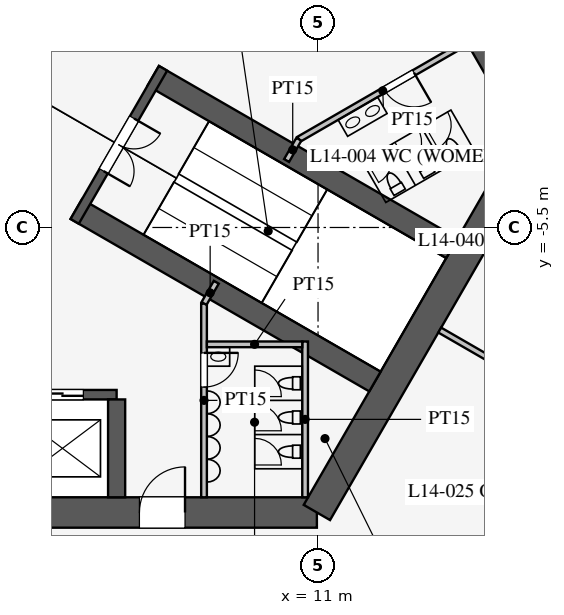
"""IFC4 building model, lengths in metres.
Left out: names, types, materials, properties, quantities, classifications, styles, units other than length and angle.
Written with IfcOpenShell. Run it as: python <this file> out.ifc"""

import sys

from ifc_helpers import new_model, si_unit, direction, frame, frame_2d, origin, place, context, subcontext, project, spatial, rectangle, extrude, element, fill, save


model = new_model("IFC4")
c1 = context("Model", 3, precision=1e-05, world=origin(), true_north=direction((0.0, 1.0)))
c2 = subcontext(c1, "Body", "Model", "MODEL_VIEW")
j1 = project(units=[si_unit("LENGTHUNIT", "METRE"), si_unit("PLANEANGLEUNIT", "RADIAN")], contexts=[c1])
p1 = place(None, origin())
s1 = spatial("IfcSite", under=j1, at=p1, CompositionType="ELEMENT")
p2 = place(p1, origin())
s2 = spatial("IfcBuilding", under=s1, at=p2, CompositionType="ELEMENT")
p3 = place(p2, frame((0.0, 0.0, 62.7)))
s3 = spatial("IfcBuildingStorey", under=s2, at=p3, CompositionType="ELEMENT", Elevation=62.7)
p4 = place(p3, frame((-10.97, -13.0, 0.0), z_axis=(0.0, 0.0, 1.0), x_axis=(1.0, 0.0, 0.0)))
e1 = element("IfcWall", 1, at=p4, inside=s3, PredefinedType="SHEAR", context=c2, shape_type="SweptSolid", body=[
    extrude(rectangle(XDim=21.939, YDim=0.8, at=frame_2d((10.97, 0.0))), origin(), (0.0, 0.0, 1.0), 4.2),
])
p5 = place(p4, frame((17.27, 0.0, 0.0)))
e2 = element("IfcOpeningElement", 2, at=p5, cuts=e1, PredefinedType="OPENING", context=c2, shape_type="SweptSolid", body=[
    extrude(rectangle(XDim=1.2, YDim=2.1, at=frame_2d((0.6, 1.05))), frame((0.0, 0.41, 0.0), z_axis=(0.0, -1.0, 0.0), x_axis=(1.0, 0.0, 0.0)), (0.0, 0.0, 1.0), 0.82),
])
p6 = place(p4, frame((3.47, 0.0, 0.0)))
e3 = element("IfcOpeningElement", 3, at=p6, cuts=e1, PredefinedType="OPENING", context=c2, shape_type="SweptSolid", body=[
    extrude(rectangle(XDim=1.2, YDim=2.1, at=frame_2d((0.6, 1.05))), frame((0.0, 0.41, 0.0), z_axis=(0.0, -1.0, 0.0), x_axis=(1.0, 0.0, 0.0)), (0.0, 0.0, 1.0), 0.82),
])
p7 = place(p3, frame((10.97, -13.0, 0.0), z_axis=(0.0, 0.0, 1.0), x_axis=(0.499995765644, 0.866027848477, 0.0)))
e4 = element("IfcWall", 4, at=p7, inside=s3, PredefinedType="SHEAR", context=c2, shape_type="SweptSolid", body=[
    extrude(rectangle(XDim=11.547, YDim=0.8, at=frame_2d((5.773, 0.0))), origin(), (0.0, 0.0, 1.0), 4.2),
])
p8 = place(p3, frame((16.743, -3.0, 0.0), z_axis=(0.0, 0.0, 1.0), x_axis=(-0.500002442456, 0.866023993627, 0.0)))
e5 = element("IfcWall", 5, at=p8, inside=s3, PredefinedType="SHEAR", context=c2, shape_type="SweptSolid", body=[
    extrude(rectangle(XDim=21.939, YDim=0.8, at=frame_2d((10.97, 0.0))), origin(), (0.0, 0.0, 1.0), 4.2),
])
p9 = place(p8, frame((17.27, 0.0, 0.0)))
e6 = element("IfcOpeningElement", 6, at=p9, cuts=e5, PredefinedType="OPENING", context=c2, shape_type="SweptSolid", body=[
    extrude(rectangle(XDim=1.2, YDim=2.1, at=frame_2d((0.6, 1.05))), frame((0.0, 0.41, 0.0), z_axis=(0.0, -1.0, 0.0), x_axis=(1.0, 0.0, 0.0)), (0.0, 0.0, 1.0), 0.82),
])
p10 = place(p8, frame((3.47, 0.0, 0.0)))
e7 = element("IfcOpeningElement", 7, at=p10, cuts=e5, PredefinedType="OPENING", context=c2, shape_type="SweptSolid", body=[
    extrude(rectangle(XDim=1.2, YDim=2.1, at=frame_2d((0.6, 1.05))), frame((0.0, 0.41, 0.0), z_axis=(0.0, -1.0, 0.0), x_axis=(1.0, 0.0, 0.0)), (0.0, 0.0, 1.0), 0.82),
])
p11 = place(p3, frame((-5.7, -9.9, 0.0), z_axis=(0.0, 0.0, 1.0), x_axis=(1.0, 0.0, 0.0)))
e8 = element("IfcWall", 8, at=p11, inside=s3, PredefinedType="SHEAR", context=c2, shape_type="SweptSolid", body=[
    extrude(rectangle(XDim=11.4, YDim=0.25, at=frame_2d((5.7, 0.0))), origin(), (0.0, 0.0, 1.0), 4.2),
])
p12 = place(p11, frame((0.875, 0.0, 0.0)))
e9 = element("IfcOpeningElement", 9, at=p12, cuts=e8, PredefinedType="OPENING", context=c2, shape_type="SweptSolid", body=[
    extrude(rectangle(XDim=1.1, YDim=2.2, at=frame_2d((0.55, 1.1))), frame((0.0, 0.135, 0.0), z_axis=(0.0, -1.0, 0.0), x_axis=(1.0, 0.0, 0.0)), (0.0, 0.0, 1.0), 0.27),
])
p13 = place(p11, frame((3.725, 0.0, 0.0)))
e10 = element("IfcOpeningElement", 10, at=p13, cuts=e8, PredefinedType="OPENING", context=c2, shape_type="SweptSolid", body=[
    extrude(rectangle(XDim=1.1, YDim=2.2, at=frame_2d((0.55, 1.1))), frame((0.0, 0.135, 0.0), z_axis=(0.0, -1.0, 0.0), x_axis=(1.0, 0.0, 0.0)), (0.0, 0.0, 1.0), 0.27),
])
p14 = place(p11, frame((6.575, 0.0, 0.0)))
e11 = element("IfcOpeningElement", 11, at=p14, cuts=e8, PredefinedType="OPENING", context=c2, shape_type="SweptSolid", body=[
    extrude(rectangle(XDim=1.1, YDim=2.2, at=frame_2d((0.55, 1.1))), frame((0.0, 0.135, 0.0), z_axis=(0.0, -1.0, 0.0), x_axis=(1.0, 0.0, 0.0)), (0.0, 0.0, 1.0), 0.27),
])
p15 = place(p11, frame((9.425, 0.0, 0.0)))
e12 = element("IfcOpeningElement", 12, at=p15, cuts=e8, PredefinedType="OPENING", context=c2, shape_type="SweptSolid", body=[
    extrude(rectangle(XDim=1.1, YDim=2.2, at=frame_2d((0.55, 1.1))), frame((0.0, 0.135, 0.0), z_axis=(0.0, -1.0, 0.0), x_axis=(1.0, 0.0, 0.0)), (0.0, 0.0, 1.0), 0.27),
])
p16 = place(p3, frame((5.7, -10.025, 0.0), z_axis=(0.0, 0.0, 1.0), x_axis=(0.0, -1.0, 0.0)))
e13 = element("IfcWall", 13, at=p16, inside=s3, PredefinedType="SHEAR", context=c2, shape_type="SweptSolid", body=[
    extrude(rectangle(XDim=2.575, YDim=0.45, at=frame_2d((1.288, 0.0))), origin(), (0.0, 0.0, 1.0), 4.2),
])
for number, where, z_axis, x_axis in (
    (14, (4.638, -5.016, 0.0), (0.0, 0.0, 1.0), (0.866, -0.5, 0.0)),
    (15, (6.663, -1.509, 0.0), (0.0, 0.0, 1.0), (0.866, -0.5, 0.0)),
):
    element("IfcWall", number, at=place(p3, frame(where, z_axis=z_axis, x_axis=x_axis)), inside=s3, PredefinedType="SHEAR", context=c2, shape_type="SweptSolid", body=[
        extrude(rectangle(XDim=9.075, YDim=0.6, at=frame_2d((4.538, 0.0))), origin(), (0.0, 0.0, 1.0), 4.2),
    ])
p17 = place(p3, frame((4.597, -5.339, 0.0), z_axis=(0.0, 0.0, 1.0), x_axis=(0.499984536904, 0.866034331223, 0.0)))
e16 = element("IfcWall", 16, at=p17, inside=s3, PredefinedType="SHEAR", context=c2, shape_type="SweptSolid", body=[
    extrude(rectangle(XDim=4.65, YDim=0.25, at=frame_2d((2.325, 0.0))), origin(), (0.0, 0.0, 1.0), 4.2),
])
p18 = place(p17, frame((1.525, 0.0, 0.0)))
e17 = element("IfcOpeningElement", 17, at=p18, cuts=e16, PredefinedType="OPENING", context=c2, shape_type="SweptSolid", body=[
    extrude(rectangle(XDim=1.6, YDim=2.1, at=frame_2d((0.8, 1.05))), frame((0.0, 0.135, 0.0), z_axis=(0.0, -1.0, 0.0), x_axis=(1.0, 0.0, 0.0)), (0.0, 0.0, 1.0), 0.27),
])
p19 = place(p3, frame((8.0, -7.5, 0.0), z_axis=(0.0, 0.0, 1.0), x_axis=(0.0, -1.0, 0.0)))
e18 = element("IfcWall", 18, at=p19, inside=s3, PredefinedType="PARTITIONING", context=c2, shape_type="SweptSolid", body=[
    extrude(rectangle(XDim=5.1, YDim=0.15, at=frame_2d((2.55, 0.0))), origin(), (0.0, 0.0, 1.0), 4.0),
])
p20 = place(p19, frame((1.3, 0.0, 0.0)))
e19 = element("IfcOpeningElement", 19, at=p20, cuts=e18, PredefinedType="OPENING", context=c2, shape_type="SweptSolid", body=[
    extrude(rectangle(XDim=0.9, YDim=2.1, at=frame_2d((0.45, 1.05))), frame((0.0, 0.085, 0.0), z_axis=(0.0, -1.0, 0.0), x_axis=(1.0, 0.0, 0.0)), (0.0, 0.0, 1.0), 0.17),
])
p21 = place(p3, frame((10.495, -3.178, 0.0), z_axis=(0.0, 0.0, 1.0), x_axis=(0.86602216432, 0.500005610874, 0.0)))
e20 = element("IfcWall", 20, at=p21, inside=s3, PredefinedType="PARTITIONING", context=c2, shape_type="SweptSolid", body=[
    extrude(rectangle(XDim=5.1, YDim=0.15, at=frame_2d((2.55, 0.0))), origin(), (0.0, 0.0, 1.0), 4.0),
])
p22 = place(p21, frame((2.6, 0.0, 0.0)))
e21 = element("IfcOpeningElement", 21, at=p22, cuts=e20, PredefinedType="OPENING", context=c2, shape_type="SweptSolid", body=[
    extrude(rectangle(XDim=0.9, YDim=2.1, at=frame_2d((0.45, 1.05))), frame((0.0, 0.085, 0.0), z_axis=(0.0, -1.0, 0.0), x_axis=(1.0, 0.0, 0.0)), (0.0, 0.0, 1.0), 0.17),
])
for number, where, z_axis, x_axis in (
    (22, (8.0, -7.5, 0.0), (0.0, 0.0, 1.0), (0.5, 0.866, 0.0)),
    (23, (10.495, -3.178, 0.0), (0.0, 0.0, 1.0), (-0.5, -0.866, 0.0)),
):
    element("IfcWall", number, at=place(p3, frame(where, z_axis=z_axis, x_axis=x_axis)), inside=s3, PredefinedType="PARTITIONING", context=c2, shape_type="SweptSolid", body=[
        extrude(rectangle(XDim=0.645, YDim=0.15, at=frame_2d((0.323, 0.0))), origin(), (0.0, 0.0, 1.0), 4.0),
    ])
p23 = place(p3, frame((10.66, -8.5, 0.0), z_axis=(0.0, 0.0, 1.0), x_axis=(0.0, -1.0, 0.0)))
e24 = element("IfcWall", 24, at=p23, inside=s3, PredefinedType="PARTITIONING", context=c2, shape_type="SweptSolid", body=[
    extrude(rectangle(XDim=4.1, YDim=0.15, at=frame_2d((2.05, 0.0))), origin(), (0.0, 0.0, 1.0), 4.0),
])
p24 = place(p3, frame((8.075, -8.575, 0.0), z_axis=(0.0, 0.0, 1.0), x_axis=(1.0, 0.0, 0.0)))
e25 = element("IfcWall", 25, at=p24, inside=s3, PredefinedType="PARTITIONING", context=c2, shape_type="SweptSolid", body=[
    extrude(rectangle(XDim=2.51, YDim=0.15, at=frame_2d((1.255, 0.0))), origin(), (0.0, 0.0, 1.0), 4.0),
])
p25 = place(p3, frame((14.203, -8.2, 0.0), z_axis=(0.0, 0.0, 1.0), x_axis=(0.866024965723, -0.500000758745, 0.0)))
e26 = element("IfcWall", 26, at=p25, inside=s3, PredefinedType="PARTITIONING", context=c2, shape_type="SweptSolid", body=[
    extrude(rectangle(XDim=18.25, YDim=0.15, at=frame_2d((9.125, 0.0))), origin(), (0.0, 0.0, 1.0), 2.3),
])
p26 = place(p3, frame((26.415, -15.231, 0.0), z_axis=(0.0, 0.0, 1.0), x_axis=(-0.50000091641, 0.866024874695, 0.0)))
e27 = element("IfcWall", 27, at=p26, inside=s3, PredefinedType="PARTITIONING", context=c2, shape_type="SweptSolid", body=[
    extrude(rectangle(XDim=52.796, YDim=0.12, at=frame_2d((26.398, 0.0))), origin(), (0.0, 0.0, 1.0), 2.9),
])
p27 = place(p26, frame((10.2, 0.0, 0.15)))
e28 = element("IfcOpeningElement", 28, at=p27, cuts=e27, PredefinedType="OPENING", context=c2, shape_type="SweptSolid", body=[
    extrude(rectangle(XDim=1.8, YDim=2.1, at=frame_2d((0.9, 1.05))), frame((0.0, 0.07, 0.0), z_axis=(0.0, -1.0, 0.0), x_axis=(1.0, 0.0, 0.0)), (0.0, 0.0, 1.0), 0.14),
])
p28 = place(p26, frame((40.8, 0.0, 0.15)))
e29 = element("IfcOpeningElement", 29, at=p28, cuts=e27, PredefinedType="OPENING", context=c2, shape_type="SweptSolid", body=[
    extrude(rectangle(XDim=1.8, YDim=2.1, at=frame_2d((0.9, 1.05))), frame((0.0, 0.07, 0.0), z_axis=(0.0, -1.0, 0.0), x_axis=(1.0, 0.0, 0.0)), (0.0, 0.0, 1.0), 0.14),
])
p29 = place(p20, origin())
e30 = element("IfcDoor", 30, at=p29, inside=s3, OperationType="SINGLE_SWING_LEFT", PredefinedType="DOOR", context=c2, shape_type="SweptSolid", body=[
    extrude(rectangle(XDim=0.9, YDim=2.1, at=frame_2d((0.45, 1.05))), frame((0.0, 0.025, 0.0), z_axis=(0.0, -1.0, 0.0), x_axis=(1.0, 0.0, 0.0)), (0.0, 0.0, 1.0), 0.05),
])
fill(e19, e30)
p30 = place(p22, frame((0.9, 0.0, 0.0), z_axis=(0.0, 0.0, 1.0), x_axis=(-1.0, 0.0, 0.0)))
e31 = element("IfcDoor", 31, at=p30, inside=s3, OperationType="SINGLE_SWING_LEFT", PredefinedType="DOOR", context=c2, shape_type="SweptSolid", body=[
    extrude(rectangle(XDim=0.9, YDim=2.1, at=frame_2d((0.45, 1.05))), frame((0.0, 0.025, 0.0), z_axis=(0.0, -1.0, 0.0), x_axis=(1.0, 0.0, 0.0)), (0.0, 0.0, 1.0), 0.05),
])
fill(e21, e31)
p31 = place(p18, frame((1.6, 0.0, 0.0), z_axis=(0.0, 0.0, 1.0), x_axis=(-1.0, 0.0, 0.0)))
e32 = element("IfcDoor", 32, at=p31, inside=s3, OperationType="DOUBLE_DOOR_SINGLE_SWING", PredefinedType="DOOR", context=c2, shape_type="SweptSolid", body=[
    extrude(rectangle(XDim=1.6, YDim=2.1, at=frame_2d((0.8, 1.05))), frame((0.0, 0.025, 0.0), z_axis=(0.0, -1.0, 0.0), x_axis=(1.0, 0.0, 0.0)), (0.0, 0.0, 1.0), 0.05),
])
fill(e17, e32)
p32 = place(p5, origin())
e33 = element("IfcDoor", 33, at=p32, inside=s3, OperationType="SINGLE_SWING_RIGHT", PredefinedType="DOOR", context=c2, shape_type="SweptSolid", body=[
    extrude(rectangle(XDim=1.2, YDim=2.1, at=frame_2d((0.6, 1.05))), frame((0.0, 0.025, 0.0), z_axis=(0.0, -1.0, 0.0), x_axis=(1.0, 0.0, 0.0)), (0.0, 0.0, 1.0), 0.05),
])
fill(e2, e33)
p33 = place(p15, origin())
e34 = element("IfcDoor", 34, at=p33, inside=s3, OperationType="DOUBLE_DOOR_SLIDING", PredefinedType="DOOR", context=c2, shape_type="SweptSolid", body=[
    extrude(rectangle(XDim=1.1, YDim=2.2, at=frame_2d((0.55, 1.1))), frame((0.0, 0.025, 0.0), z_axis=(0.0, -1.0, 0.0), x_axis=(1.0, 0.0, 0.0)), (0.0, 0.0, 1.0), 0.05),
])
fill(e12, e34)
save(model, sys.argv[1])
